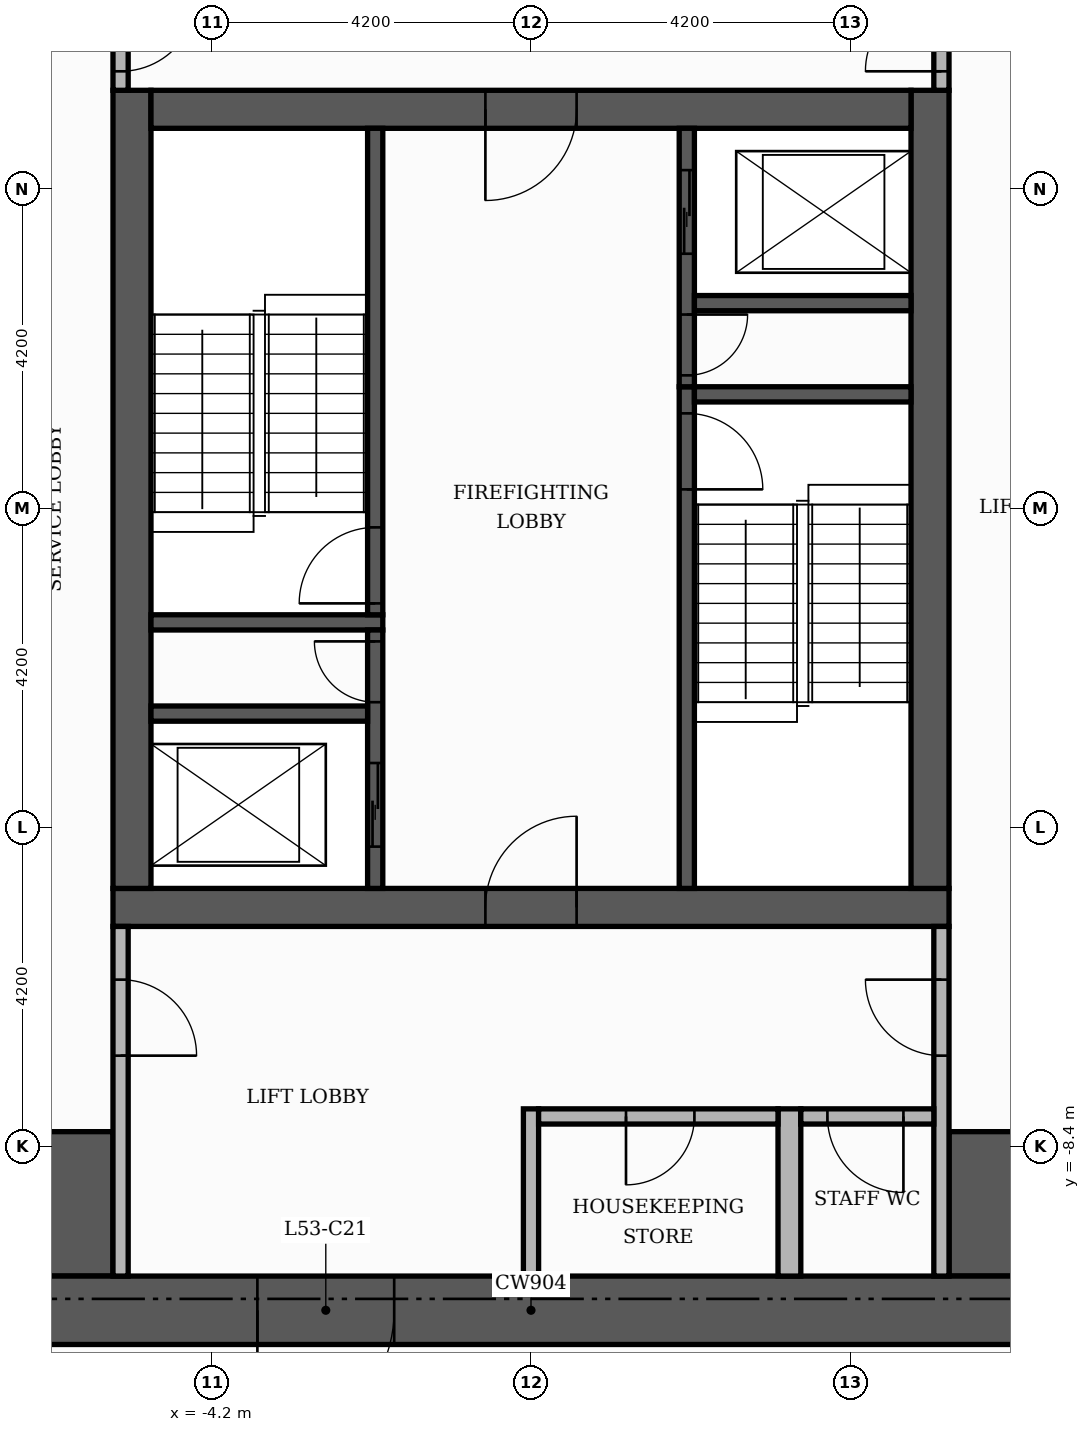
"""IFC4 building model, lengths in metres.
Left out: names, types, materials, properties, quantities, classifications, styles, units other than length and angle.
Written with IfcOpenShell. Run it as: python <this file> out.ifc"""

import sys

from ifc_helpers import new_model, si_unit, direction, frame, frame_2d, origin, place, context, subcontext, project, spatial, rectangle, extrude, element, fill, save


model = new_model("IFC4")
c1 = context("Model", 3, precision=1e-05, world=origin(), true_north=direction((0.0, 1.0)))
c2 = subcontext(c1, "Body", "Model", "MODEL_VIEW")
j1 = project(units=[si_unit("LENGTHUNIT", "METRE"), si_unit("PLANEANGLEUNIT", "RADIAN")], contexts=[c1])
p1 = place(None, origin())
s1 = spatial("IfcSite", under=j1, at=p1, CompositionType="ELEMENT")
p2 = place(p1, origin())
s2 = spatial("IfcBuilding", under=s1, at=p2, CompositionType="ELEMENT")
p3 = place(p2, frame((0.0, 0.0, 223.5)))
s3 = spatial("IfcBuildingStorey", under=s2, at=p3, CompositionType="ELEMENT", Elevation=223.5)
p4 = place(p3, frame((-5.5, -5.25, 0.0), z_axis=(0.0, 0.0, 1.0), x_axis=(1.0, 0.0, 0.0)))
e1 = element("IfcWall", 1, at=p4, inside=s3, PredefinedType="SHEAR", context=c2, shape_type="SweptSolid", body=[
    extrude(rectangle(XDim=11.0, YDim=0.5, at=frame_2d((5.5, 0.0))), origin(), (0.0, 0.0, 1.0), 3.48),
])
p5 = place(p4, frame((4.9, 0.0, 0.0)))
e2 = element("IfcOpeningElement", 2, at=p5, cuts=e1, PredefinedType="OPENING", context=c2, shape_type="SweptSolid", body=[
    extrude(rectangle(XDim=1.2, YDim=2.1, at=frame_2d((0.6, 1.05))), frame((0.0, 0.26, 0.0), z_axis=(0.0, -1.0, 0.0), x_axis=(1.0, 0.0, 0.0)), (0.0, 0.0, 1.0), 0.52),
])
for number, where, z_axis, x_axis in (
    (3, (-5.25, -5.0, 0.0), (0.0, 0.0, 1.0), (0.0, 1.0, 0.0)),
    (4, (5.25, -5.0, 0.0), (0.0, 0.0, 1.0), (0.0, 1.0, 0.0)),
):
    element("IfcWall", number, at=place(p3, frame(where, z_axis=z_axis, x_axis=x_axis)), inside=s3, PredefinedType="SHEAR", context=c2, shape_type="SweptSolid", body=[
        extrude(rectangle(XDim=10.5, YDim=0.5, at=frame_2d((5.25, 0.0))), origin(), (0.0, 0.0, 1.0), 3.48),
    ])
p6 = place(p3, frame((-5.0, 5.25, 0.0), z_axis=(0.0, 0.0, 1.0), x_axis=(1.0, 0.0, 0.0)))
e5 = element("IfcWall", 5, at=p6, inside=s3, PredefinedType="SHEAR", context=c2, shape_type="SweptSolid", body=[
    extrude(rectangle(XDim=10.0, YDim=0.5, at=frame_2d((5.0, 0.0))), origin(), (0.0, 0.0, 1.0), 3.48),
])
p7 = place(p6, frame((4.4, 0.0, 0.0)))
e6 = element("IfcOpeningElement", 6, at=p7, cuts=e5, PredefinedType="OPENING", context=c2, shape_type="SweptSolid", body=[
    extrude(rectangle(XDim=1.2, YDim=2.1, at=frame_2d((0.6, 1.05))), frame((0.0, 0.26, 0.0), z_axis=(0.0, -1.0, 0.0), x_axis=(1.0, 0.0, 0.0)), (0.0, 0.0, 1.0), 0.52),
])
for number, where, z_axis, x_axis in (
    (7, (-10.1, -9.15, 0.0), (0.0, 0.0, 1.0), (1.0, 0.0, 0.0)),
    (8, (5.5, -9.15, 0.0), (0.0, 0.0, 1.0), (1.0, 0.0, 0.0)),
):
    element("IfcWall", number, at=place(p3, frame(where, z_axis=z_axis, x_axis=x_axis)), inside=s3, PredefinedType="SHEAR", context=c2, shape_type="SweptSolid", body=[
        extrude(rectangle(XDim=4.6, YDim=1.9, at=frame_2d((2.3, 0.0))), origin(), (0.0, 0.0, 1.0), 3.48),
    ])
p8 = place(p3, frame((2.05, -5.0, 0.0), z_axis=(0.0, 0.0, 1.0), x_axis=(0.0, 1.0, 0.0)))
e9 = element("IfcWall", 9, at=p8, inside=s3, PredefinedType="SHEAR", context=c2, shape_type="SweptSolid", body=[
    extrude(rectangle(XDim=6.6, YDim=0.2, at=frame_2d((3.3, 0.0))), origin(), (0.0, 0.0, 1.0), 3.48),
])
p9 = place(p8, frame((5.25, 0.0, 0.0)))
e10 = element("IfcOpeningElement", 10, at=p9, cuts=e9, PredefinedType="OPENING", context=c2, shape_type="SweptSolid", body=[
    extrude(rectangle(XDim=1.0, YDim=2.1, at=frame_2d((0.5, 1.05))), frame((0.0, 0.11, 0.0), z_axis=(0.0, -1.0, 0.0), x_axis=(1.0, 0.0, 0.0)), (0.0, 0.0, 1.0), 0.22),
])
p10 = place(p3, frame((-5.0, -1.5, 0.0), z_axis=(0.0, 0.0, 1.0), x_axis=(1.0, 0.0, 0.0)))
e11 = element("IfcWall", 11, at=p10, inside=s3, PredefinedType="SHEAR", context=c2, shape_type="SweptSolid", body=[
    extrude(rectangle(XDim=3.05, YDim=0.2, at=frame_2d((1.525, 0.0))), origin(), (0.0, 0.0, 1.0), 3.48),
])
p11 = place(p3, frame((-2.05, -1.4, 0.0), z_axis=(0.0, 0.0, 1.0), x_axis=(0.0, 1.0, 0.0)))
e12 = element("IfcWall", 12, at=p11, inside=s3, PredefinedType="SHEAR", context=c2, shape_type="SweptSolid", body=[
    extrude(rectangle(XDim=6.4, YDim=0.2, at=frame_2d((3.2, 0.0))), origin(), (0.0, 0.0, 1.0), 3.48),
])
p12 = place(p11, frame((0.15, 0.0, 0.0)))
e13 = element("IfcOpeningElement", 13, at=p12, cuts=e12, PredefinedType="OPENING", context=c2, shape_type="SweptSolid", body=[
    extrude(rectangle(XDim=1.0, YDim=2.1, at=frame_2d((0.5, 1.05))), frame((0.0, 0.11, 0.0), z_axis=(0.0, -1.0, 0.0), x_axis=(1.0, 0.0, 0.0)), (0.0, 0.0, 1.0), 0.22),
])
p13 = place(p3, frame((2.15, 1.5, 0.0), z_axis=(0.0, 0.0, 1.0), x_axis=(1.0, 0.0, 0.0)))
e14 = element("IfcWall", 14, at=p13, inside=s3, PredefinedType="SHEAR", context=c2, shape_type="SweptSolid", body=[
    extrude(rectangle(XDim=2.85, YDim=0.2, at=frame_2d((1.425, 0.0))), origin(), (0.0, 0.0, 1.0), 3.48),
])
p14 = place(p3, frame((-2.05, -5.0, 0.0), z_axis=(0.0, 0.0, 1.0), x_axis=(0.0, 1.0, 0.0)))
e15 = element("IfcWall", 15, at=p14, inside=s3, PredefinedType="SHEAR", context=c2, shape_type="SweptSolid", body=[
    extrude(rectangle(XDim=3.4, YDim=0.2, at=frame_2d((1.7, 0.0))), origin(), (0.0, 0.0, 1.0), 3.48),
])
p15 = place(p14, frame((0.55, 0.0, 0.0)))
e16 = element("IfcOpeningElement", 16, at=p15, cuts=e15, PredefinedType="OPENING", context=c2, shape_type="SweptSolid", body=[
    extrude(rectangle(XDim=1.1, YDim=2.1, at=frame_2d((0.55, 1.05))), frame((0.0, 0.11, 0.0), z_axis=(0.0, -1.0, 0.0), x_axis=(1.0, 0.0, 0.0)), (0.0, 0.0, 1.0), 0.22),
])
p16 = place(p14, frame((2.45, 0.0, 0.0)))
e17 = element("IfcOpeningElement", 17, at=p16, cuts=e15, PredefinedType="OPENING", context=c2, shape_type="SweptSolid", body=[
    extrude(rectangle(XDim=0.8, YDim=2.1, at=frame_2d((0.4, 1.05))), frame((0.0, 0.11, 0.0), z_axis=(0.0, -1.0, 0.0), x_axis=(1.0, 0.0, 0.0)), (0.0, 0.0, 1.0), 0.22),
])
p17 = place(p3, frame((-5.0, -2.7, 0.0), z_axis=(0.0, 0.0, 1.0), x_axis=(1.0, 0.0, 0.0)))
e18 = element("IfcWall", 18, at=p17, inside=s3, PredefinedType="SHEAR", context=c2, shape_type="SweptSolid", body=[
    extrude(rectangle(XDim=2.85, YDim=0.2, at=frame_2d((1.425, 0.0))), origin(), (0.0, 0.0, 1.0), 3.48),
])
p18 = place(p3, frame((2.05, 1.6, 0.0), z_axis=(0.0, 0.0, 1.0), x_axis=(0.0, 1.0, 0.0)))
e19 = element("IfcWall", 19, at=p18, inside=s3, PredefinedType="SHEAR", context=c2, shape_type="SweptSolid", body=[
    extrude(rectangle(XDim=3.4, YDim=0.2, at=frame_2d((1.7, 0.0))), origin(), (0.0, 0.0, 1.0), 3.48),
])
p19 = place(p18, frame((1.75, 0.0, 0.0)))
e20 = element("IfcOpeningElement", 20, at=p19, cuts=e19, PredefinedType="OPENING", context=c2, shape_type="SweptSolid", body=[
    extrude(rectangle(XDim=1.1, YDim=2.1, at=frame_2d((0.55, 1.05))), frame((0.0, 0.11, 0.0), z_axis=(0.0, -1.0, 0.0), x_axis=(1.0, 0.0, 0.0)), (0.0, 0.0, 1.0), 0.22),
])
p20 = place(p18, frame((0.15, 0.0, 0.0)))
e21 = element("IfcOpeningElement", 21, at=p20, cuts=e19, PredefinedType="OPENING", context=c2, shape_type="SweptSolid", body=[
    extrude(rectangle(XDim=0.8, YDim=2.1, at=frame_2d((0.4, 1.05))), frame((0.0, 0.11, 0.0), z_axis=(0.0, -1.0, 0.0), x_axis=(1.0, 0.0, 0.0)), (0.0, 0.0, 1.0), 0.22),
])
p21 = place(p3, frame((2.15, 2.7, 0.0), z_axis=(0.0, 0.0, 1.0), x_axis=(1.0, 0.0, 0.0)))
e22 = element("IfcWall", 22, at=p21, inside=s3, PredefinedType="SHEAR", context=c2, shape_type="SweptSolid", body=[
    extrude(rectangle(XDim=2.85, YDim=0.2, at=frame_2d((1.425, 0.0))), origin(), (0.0, 0.0, 1.0), 3.48),
])
p22 = place(p3, frame((-11.0, -10.55, 0.0), z_axis=(0.0, 0.0, 1.0), x_axis=(1.0, 0.0, 0.0)))
e23 = element("IfcWall", 23, at=p22, inside=s3, PredefinedType="SHEAR", context=c2, shape_type="SweptSolid", body=[
    extrude(rectangle(XDim=22.0, YDim=0.9, at=frame_2d((11.0, 0.0))), origin(), (0.0, 0.0, 1.0), 3.48),
])
p23 = place(p22, frame((7.4, 0.0, 0.0)))
e24 = element("IfcOpeningElement", 24, at=p23, cuts=e23, PredefinedType="OPENING", context=c2, shape_type="SweptSolid", body=[
    extrude(rectangle(XDim=1.8, YDim=2.2, at=frame_2d((0.9, 1.1))), frame((0.0, 0.46, 0.0), z_axis=(0.0, -1.0, 0.0), x_axis=(1.0, 0.0, 0.0)), (0.0, 0.0, 1.0), 0.92),
])
p24 = place(p3, frame((-5.4, -10.1, 0.0), z_axis=(0.0, 0.0, 1.0), x_axis=(0.0, 1.0, 0.0)))
e25 = element("IfcWall", 25, at=p24, inside=s3, PredefinedType="PARTITIONING", context=c2, shape_type="SweptSolid", body=[
    extrude(rectangle(XDim=4.6, YDim=0.2, at=frame_2d((2.3, 0.0))), origin(), (0.0, 0.0, 1.0), 3.48),
])
p25 = place(p24, frame((2.9, 0.0, 0.0)))
e26 = element("IfcOpeningElement", 26, at=p25, cuts=e25, PredefinedType="OPENING", context=c2, shape_type="SweptSolid", body=[
    extrude(rectangle(XDim=1.0, YDim=2.1, at=frame_2d((0.5, 1.05))), frame((0.0, 0.11, 0.0), z_axis=(0.0, -1.0, 0.0), x_axis=(1.0, 0.0, 0.0)), (0.0, 0.0, 1.0), 0.22),
])
p26 = place(p3, frame((0.0, -10.1, 0.0), z_axis=(0.0, 0.0, 1.0), x_axis=(0.0, 1.0, 0.0)))
e27 = element("IfcWall", 27, at=p26, inside=s3, PredefinedType="PARTITIONING", context=c2, shape_type="SweptSolid", body=[
    extrude(rectangle(XDim=2.2, YDim=0.2, at=frame_2d((1.1, 0.0))), origin(), (0.0, 0.0, 1.0), 3.48),
])
p27 = place(p3, frame((3.4, -10.1, 0.0), z_axis=(0.0, 0.0, 1.0), x_axis=(0.0, 1.0, 0.0)))
e28 = element("IfcWall", 28, at=p27, inside=s3, PredefinedType="PARTITIONING", context=c2, shape_type="SweptSolid", body=[
    extrude(rectangle(XDim=2.2, YDim=0.3, at=frame_2d((1.1, 0.0))), origin(), (0.0, 0.0, 1.0), 3.48),
])
p28 = place(p3, frame((5.4, -10.1, 0.0), z_axis=(0.0, 0.0, 1.0), x_axis=(0.0, 1.0, 0.0)))
e29 = element("IfcWall", 29, at=p28, inside=s3, PredefinedType="PARTITIONING", context=c2, shape_type="SweptSolid", body=[
    extrude(rectangle(XDim=4.6, YDim=0.2, at=frame_2d((2.3, 0.0))), origin(), (0.0, 0.0, 1.0), 3.48),
])
p29 = place(p28, frame((2.9, 0.0, 0.0)))
e30 = element("IfcOpeningElement", 30, at=p29, cuts=e29, PredefinedType="OPENING", context=c2, shape_type="SweptSolid", body=[
    extrude(rectangle(XDim=1.0, YDim=2.1, at=frame_2d((0.5, 1.05))), frame((0.0, 0.11, 0.0), z_axis=(0.0, -1.0, 0.0), x_axis=(1.0, 0.0, 0.0)), (0.0, 0.0, 1.0), 0.22),
])
p30 = place(p3, frame((0.1, -8.0, 0.0), z_axis=(0.0, 0.0, 1.0), x_axis=(1.0, 0.0, 0.0)))
e31 = element("IfcWall", 31, at=p30, inside=s3, PredefinedType="PARTITIONING", context=c2, shape_type="SweptSolid", body=[
    extrude(rectangle(XDim=3.15, YDim=0.2, at=frame_2d((1.575, 0.0))), origin(), (0.0, 0.0, 1.0), 3.48),
])
p31 = place(p30, frame((1.15, 0.0, 0.0)))
e32 = element("IfcOpeningElement", 32, at=p31, cuts=e31, PredefinedType="OPENING", context=c2, shape_type="SweptSolid", body=[
    extrude(rectangle(XDim=0.9, YDim=2.1, at=frame_2d((0.45, 1.05))), frame((0.0, 0.11, 0.0), z_axis=(0.0, -1.0, 0.0), x_axis=(1.0, 0.0, 0.0)), (0.0, 0.0, 1.0), 0.22),
])
p32 = place(p3, frame((3.55, -8.0, 0.0), z_axis=(0.0, 0.0, 1.0), x_axis=(1.0, 0.0, 0.0)))
e33 = element("IfcWall", 33, at=p32, inside=s3, PredefinedType="PARTITIONING", context=c2, shape_type="SweptSolid", body=[
    extrude(rectangle(XDim=1.75, YDim=0.2, at=frame_2d((0.875, 0.0))), origin(), (0.0, 0.0, 1.0), 3.48),
])
p33 = place(p32, frame((0.35, 0.0, 0.0)))
e34 = element("IfcOpeningElement", 34, at=p33, cuts=e33, PredefinedType="OPENING", context=c2, shape_type="SweptSolid", body=[
    extrude(rectangle(XDim=1.0, YDim=2.1, at=frame_2d((0.5, 1.05))), frame((0.0, 0.11, 0.0), z_axis=(0.0, -1.0, 0.0), x_axis=(1.0, 0.0, 0.0)), (0.0, 0.0, 1.0), 0.22),
])
p34 = place(p3, frame((-5.4, 5.5, 0.0), z_axis=(0.0, 0.0, 1.0), x_axis=(0.0, 1.0, 0.0)))
e35 = element("IfcWall", 35, at=p34, inside=s3, PredefinedType="PARTITIONING", context=c2, shape_type="SweptSolid", body=[
    extrude(rectangle(XDim=1.55, YDim=0.2, at=frame_2d((0.775, 0.0))), origin(), (0.0, 0.0, 1.0), 3.48),
])
p35 = place(p34, frame((0.25, 0.0, 0.0)))
e36 = element("IfcOpeningElement", 36, at=p35, cuts=e35, PredefinedType="OPENING", context=c2, shape_type="SweptSolid", body=[
    extrude(rectangle(XDim=1.0, YDim=2.1, at=frame_2d((0.5, 1.05))), frame((0.0, 0.11, 0.0), z_axis=(0.0, -1.0, 0.0), x_axis=(1.0, 0.0, 0.0)), (0.0, 0.0, 1.0), 0.22),
])
p36 = place(p3, frame((5.4, 5.5, 0.0), z_axis=(0.0, 0.0, 1.0), x_axis=(0.0, 1.0, 0.0)))
e37 = element("IfcWall", 37, at=p36, inside=s3, PredefinedType="PARTITIONING", context=c2, shape_type="SweptSolid", body=[
    extrude(rectangle(XDim=4.6, YDim=0.2, at=frame_2d((2.3, 0.0))), origin(), (0.0, 0.0, 1.0), 3.48),
])
p37 = place(p36, frame((0.25, 0.0, 0.0)))
e38 = element("IfcOpeningElement", 38, at=p37, cuts=e37, PredefinedType="OPENING", context=c2, shape_type="SweptSolid", body=[
    extrude(rectangle(XDim=1.0, YDim=2.1, at=frame_2d((0.5, 1.05))), frame((0.0, 0.11, 0.0), z_axis=(0.0, -1.0, 0.0), x_axis=(1.0, 0.0, 0.0)), (0.0, 0.0, 1.0), 0.22),
])
p38 = place(p19, origin())
e39 = element("IfcDoor", 39, at=p38, inside=s3, OperationType="SLIDING_TO_LEFT", PredefinedType="DOOR", context=c2, shape_type="SweptSolid", body=[
    extrude(rectangle(XDim=1.1, YDim=2.1, at=frame_2d((0.55, 1.05))), frame((0.0, 0.025, 0.0), z_axis=(0.0, -1.0, 0.0), x_axis=(1.0, 0.0, 0.0)), (0.0, 0.0, 1.0), 0.05),
])
fill(e20, e39)
p39 = place(p15, origin())
e40 = element("IfcDoor", 40, at=p39, inside=s3, OperationType="SLIDING_TO_LEFT", PredefinedType="DOOR", context=c2, shape_type="SweptSolid", body=[
    extrude(rectangle(XDim=1.1, YDim=2.1, at=frame_2d((0.55, 1.05))), frame((0.0, 0.025, 0.0), z_axis=(0.0, -1.0, 0.0), x_axis=(1.0, 0.0, 0.0)), (0.0, 0.0, 1.0), 0.05),
])
fill(e16, e40)
p40 = place(p12, origin())
e41 = element("IfcDoor", 41, at=p40, inside=s3, OperationType="SINGLE_SWING_LEFT", PredefinedType="DOOR", context=c2, shape_type="SweptSolid", body=[
    extrude(rectangle(XDim=1.0, YDim=2.1, at=frame_2d((0.5, 1.05))), frame((0.0, 0.025, 0.0), z_axis=(0.0, -1.0, 0.0), x_axis=(1.0, 0.0, 0.0)), (0.0, 0.0, 1.0), 0.05),
])
fill(e13, e41)
p41 = place(p9, frame((1.0, 0.0, 0.0), z_axis=(0.0, 0.0, 1.0), x_axis=(-1.0, 0.0, 0.0)))
e42 = element("IfcDoor", 42, at=p41, inside=s3, OperationType="SINGLE_SWING_LEFT", PredefinedType="DOOR", context=c2, shape_type="SweptSolid", body=[
    extrude(rectangle(XDim=1.0, YDim=2.1, at=frame_2d((0.5, 1.05))), frame((0.0, 0.025, 0.0), z_axis=(0.0, -1.0, 0.0), x_axis=(1.0, 0.0, 0.0)), (0.0, 0.0, 1.0), 0.05),
])
fill(e10, e42)
p42 = place(p20, frame((0.8, 0.0, 0.0), z_axis=(0.0, 0.0, 1.0), x_axis=(-1.0, 0.0, 0.0)))
e43 = element("IfcDoor", 43, at=p42, inside=s3, OperationType="SINGLE_SWING_RIGHT", PredefinedType="DOOR", context=c2, shape_type="SweptSolid", body=[
    extrude(rectangle(XDim=0.8, YDim=2.1, at=frame_2d((0.4, 1.05))), frame((0.0, 0.025, 0.0), z_axis=(0.0, -1.0, 0.0), x_axis=(1.0, 0.0, 0.0)), (0.0, 0.0, 1.0), 0.05),
])
fill(e21, e43)
p43 = place(p16, origin())
e44 = element("IfcDoor", 44, at=p43, inside=s3, OperationType="SINGLE_SWING_RIGHT", PredefinedType="DOOR", context=c2, shape_type="SweptSolid", body=[
    extrude(rectangle(XDim=0.8, YDim=2.1, at=frame_2d((0.4, 1.05))), frame((0.0, 0.025, 0.0), z_axis=(0.0, -1.0, 0.0), x_axis=(1.0, 0.0, 0.0)), (0.0, 0.0, 1.0), 0.05),
])
fill(e17, e44)
p44 = place(p7, frame((1.2, 0.0, 0.0), z_axis=(0.0, 0.0, 1.0), x_axis=(-1.0, 0.0, 0.0)))
e45 = element("IfcDoor", 45, at=p44, inside=s3, OperationType="SINGLE_SWING_LEFT", PredefinedType="DOOR", context=c2, shape_type="SweptSolid", body=[
    extrude(rectangle(XDim=1.2, YDim=2.1, at=frame_2d((0.6, 1.05))), frame((0.0, 0.025, 0.0), z_axis=(0.0, -1.0, 0.0), x_axis=(1.0, 0.0, 0.0)), (0.0, 0.0, 1.0), 0.05),
])
fill(e6, e45)
p45 = place(p5, origin())
e46 = element("IfcDoor", 46, at=p45, inside=s3, OperationType="SINGLE_SWING_RIGHT", PredefinedType="DOOR", context=c2, shape_type="SweptSolid", body=[
    extrude(rectangle(XDim=1.2, YDim=2.1, at=frame_2d((0.6, 1.05))), frame((0.0, 0.025, 0.0), z_axis=(0.0, -1.0, 0.0), x_axis=(1.0, 0.0, 0.0)), (0.0, 0.0, 1.0), 0.05),
])
fill(e2, e46)
p46 = place(p35, frame((1.0, 0.0, 0.0), z_axis=(0.0, 0.0, 1.0), x_axis=(-1.0, 0.0, 0.0)))
e47 = element("IfcDoor", 47, at=p46, inside=s3, OperationType="SINGLE_SWING_RIGHT", PredefinedType="DOOR", context=c2, shape_type="SweptSolid", body=[
    extrude(rectangle(XDim=1.0, YDim=2.1, at=frame_2d((0.5, 1.05))), frame((0.0, 0.025, 0.0), z_axis=(0.0, -1.0, 0.0), x_axis=(1.0, 0.0, 0.0)), (0.0, 0.0, 1.0), 0.05),
])
fill(e36, e47)
p47 = place(p37, origin())
e48 = element("IfcDoor", 48, at=p47, inside=s3, OperationType="SINGLE_SWING_LEFT", PredefinedType="DOOR", context=c2, shape_type="SweptSolid", body=[
    extrude(rectangle(XDim=1.0, YDim=2.1, at=frame_2d((0.5, 1.05))), frame((0.0, 0.025, 0.0), z_axis=(0.0, -1.0, 0.0), x_axis=(1.0, 0.0, 0.0)), (0.0, 0.0, 1.0), 0.05),
])
fill(e38, e48)
p48 = place(p25, frame((1.0, 0.0, 0.0), z_axis=(0.0, 0.0, 1.0), x_axis=(-1.0, 0.0, 0.0)))
e49 = element("IfcDoor", 49, at=p48, inside=s3, OperationType="SINGLE_SWING_LEFT", PredefinedType="DOOR", context=c2, shape_type="SweptSolid", body=[
    extrude(rectangle(XDim=1.0, YDim=2.1, at=frame_2d((0.5, 1.05))), frame((0.0, 0.025, 0.0), z_axis=(0.0, -1.0, 0.0), x_axis=(1.0, 0.0, 0.0)), (0.0, 0.0, 1.0), 0.05),
])
fill(e26, e49)
p49 = place(p29, origin())
e50 = element("IfcDoor", 50, at=p49, inside=s3, OperationType="SINGLE_SWING_RIGHT", PredefinedType="DOOR", context=c2, shape_type="SweptSolid", body=[
    extrude(rectangle(XDim=1.0, YDim=2.1, at=frame_2d((0.5, 1.05))), frame((0.0, 0.025, 0.0), z_axis=(0.0, -1.0, 0.0), x_axis=(1.0, 0.0, 0.0)), (0.0, 0.0, 1.0), 0.05),
])
fill(e30, e50)
p50 = place(p23, frame((1.8, 0.0, 0.0), z_axis=(0.0, 0.0, 1.0), x_axis=(-1.0, 0.0, 0.0)))
e51 = element("IfcDoor", 51, at=p50, inside=s3, OperationType="DOUBLE_DOOR_SINGLE_SWING", PredefinedType="DOOR", context=c2, shape_type="SweptSolid", body=[
    extrude(rectangle(XDim=1.8, YDim=2.2, at=frame_2d((0.9, 1.1))), frame((0.0, 0.025, 0.0), z_axis=(0.0, -1.0, 0.0), x_axis=(1.0, 0.0, 0.0)), (0.0, 0.0, 1.0), 0.05),
])
fill(e24, e51)
p51 = place(p31, frame((0.9, 0.0, 0.0), z_axis=(0.0, 0.0, 1.0), x_axis=(-1.0, 0.0, 0.0)))
e52 = element("IfcDoor", 52, at=p51, inside=s3, OperationType="SINGLE_SWING_LEFT", PredefinedType="DOOR", context=c2, shape_type="SweptSolid", body=[
    extrude(rectangle(XDim=0.9, YDim=2.1, at=frame_2d((0.45, 1.05))), frame((0.0, 0.025, 0.0), z_axis=(0.0, -1.0, 0.0), x_axis=(1.0, 0.0, 0.0)), (0.0, 0.0, 1.0), 0.05),
])
fill(e32, e52)
p52 = place(p33, frame((1.0, 0.0, 0.0), z_axis=(0.0, 0.0, 1.0), x_axis=(-1.0, 0.0, 0.0)))
e53 = element("IfcDoor", 53, at=p52, inside=s3, OperationType="SINGLE_SWING_RIGHT", PredefinedType="DOOR", context=c2, shape_type="SweptSolid", body=[
    extrude(rectangle(XDim=1.0, YDim=2.1, at=frame_2d((0.5, 1.05))), frame((0.0, 0.025, 0.0), z_axis=(0.0, -1.0, 0.0), x_axis=(1.0, 0.0, 0.0)), (0.0, 0.0, 1.0), 0.05),
])
fill(e34, e53)
save(model, sys.argv[1])
